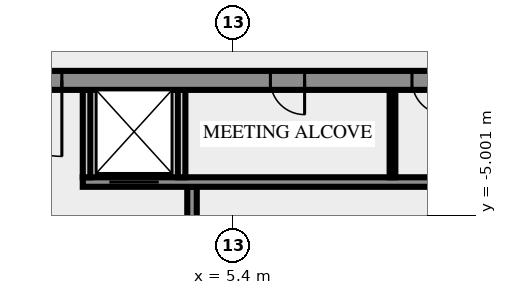
"""IFC4 building model, lengths in metres.
Left out: names, types, materials, properties, quantities, classifications, styles, units other than length and angle.
Written with IfcOpenShell. Run it as: python <this file> out.ifc"""

import sys

from ifc_helpers import new_model, si_unit, direction, frame, frame_2d, origin, place, context, subcontext, project, spatial, rectangle, extrude, element, fill, save


model = new_model("IFC4")
c1 = context("Model", 3, precision=1e-05, world=origin(), true_north=direction((0.0, 1.0)))
c2 = subcontext(c1, "Body", "Model", "MODEL_VIEW")
j1 = project(units=[si_unit("LENGTHUNIT", "METRE"), si_unit("PLANEANGLEUNIT", "RADIAN")], contexts=[c1])
p1 = place(None, origin())
s1 = spatial("IfcSite", under=j1, at=p1, CompositionType="ELEMENT")
p2 = place(p1, origin())
s2 = spatial("IfcBuilding", under=s1, at=p2, CompositionType="ELEMENT")
p3 = place(p2, frame((0.0, 0.0, 265.0)))
s3 = spatial("IfcBuildingStorey", under=s2, at=p3, CompositionType="ELEMENT", Elevation=265.0)
p4 = place(p3, frame((4.325, -7.25, 0.0), z_axis=(0.0, 0.0, 1.0), x_axis=(0.0, 1.0, 0.0)))
e1 = element("IfcWall", 1, at=p4, inside=s3, PredefinedType="SHEAR", context=c2, shape_type="SweptSolid", body=[
    extrude(rectangle(XDim=3.0, YDim=0.25, at=frame_2d((1.5, 0.0))), origin(), (0.0, 0.0, 1.0), 3.65),
])
p5 = place(p4, frame((0.8, 0.0, 0.0)))
e2 = element("IfcOpeningElement", 2, at=p5, cuts=e1, PredefinedType="OPENING", context=c2, shape_type="SweptSolid", body=[
    extrude(rectangle(XDim=1.4, YDim=2.1, at=frame_2d((0.7, 1.05))), frame((0.0, 0.135, 0.0), z_axis=(0.0, -1.0, 0.0), x_axis=(1.0, 0.0, 0.0)), (0.0, 0.0, 1.0), 0.27),
])
p6 = place(p3, frame((1.45, -4.125, 0.0), z_axis=(0.0, 0.0, 1.0), x_axis=(1.0, 0.0, 0.0)))
e3 = element("IfcWall", 3, at=p6, inside=s3, PredefinedType="SHEAR", context=c2, shape_type="SweptSolid", body=[
    extrude(rectangle(XDim=12.9, YDim=0.25, at=frame_2d((6.45, 0.0))), origin(), (0.0, 0.0, 1.0), 3.65),
])
p7 = place(p6, frame((0.7, 0.0, 0.0)))
e4 = element("IfcOpeningElement", 4, at=p7, cuts=e3, PredefinedType="OPENING", context=c2, shape_type="SweptSolid", body=[
    extrude(rectangle(XDim=1.3, YDim=2.1, at=frame_2d((0.65, 1.05))), frame((0.0, 0.135, 0.0), z_axis=(0.0, -1.0, 0.0), x_axis=(1.0, 0.0, 0.0)), (0.0, 0.0, 1.0), 0.27),
])
for number, where, z_axis, x_axis in (
    (5, (1.55, -4.0, 0.0), (0.0, 0.0, 1.0), (0.0, 1.0, 0.0)),
    (6, (4.05, -4.0, 0.0), (0.0, 0.0, 1.0), (0.0, 1.0, 0.0)),
):
    element("IfcWall", number, at=place(p3, frame(where, z_axis=z_axis, x_axis=x_axis)), inside=s3, PredefinedType="SOLIDWALL", context=c2, shape_type="SweptSolid", body=[
        extrude(rectangle(XDim=2.3, YDim=0.2, at=frame_2d((1.15, 0.0))), origin(), (0.0, 0.0, 1.0), 3.65),
    ])
p8 = place(p3, frame((9.6, -4.0, 0.0), z_axis=(0.0, 0.0, 1.0), x_axis=(0.0, 1.0, 0.0)))
e7 = element("IfcWall", 7, at=p8, inside=s3, PredefinedType="PARTITIONING", context=c2, shape_type="SweptSolid", body=[
    extrude(rectangle(XDim=2.3, YDim=0.15, at=frame_2d((1.15, 0.0))), origin(), (0.0, 0.0, 1.0), 3.65),
])
p9 = place(p3, frame((20.49, -1.45, 0.0), z_axis=(0.0, 0.0, 1.0), x_axis=(-1.0, 0.0, 0.0)))
e8 = element("IfcWall", 8, at=p9, inside=s3, PredefinedType="SHEAR", context=c2, shape_type="SweptSolid", body=[
    extrude(rectangle(XDim=40.98, YDim=0.5, at=frame_2d((20.49, 0.0))), origin(), (0.0, 0.0, 1.0), 3.65),
])
p10 = place(p9, frame((38.14, 0.0, 0.0)))
e9 = element("IfcOpeningElement", 9, at=p10, cuts=e8, PredefinedType="OPENING", context=c2, shape_type="SweptSolid", body=[
    extrude(rectangle(XDim=1.8, YDim=2.1, at=frame_2d((0.9, 1.05))), frame((0.0, 0.26, 0.0), z_axis=(0.0, -1.0, 0.0), x_axis=(1.0, 0.0, 0.0)), (0.0, 0.0, 1.0), 0.52),
])
p11 = place(p9, frame((36.728, 0.0, 0.0)))
e10 = element("IfcOpeningElement", 10, at=p11, cuts=e8, PredefinedType="OPENING", context=c2, shape_type="SweptSolid", body=[
    extrude(rectangle(XDim=0.8, YDim=2.1, at=frame_2d((0.4, 1.05))), frame((0.0, 0.26, 0.0), z_axis=(0.0, -1.0, 0.0), x_axis=(1.0, 0.0, 0.0)), (0.0, 0.0, 1.0), 0.52),
])
p12 = place(p9, frame((35.153, 0.0, 0.0)))
e11 = element("IfcOpeningElement", 11, at=p12, cuts=e8, PredefinedType="OPENING", context=c2, shape_type="SweptSolid", body=[
    extrude(rectangle(XDim=0.8, YDim=2.1, at=frame_2d((0.4, 1.05))), frame((0.0, 0.26, 0.0), z_axis=(0.0, -1.0, 0.0), x_axis=(1.0, 0.0, 0.0)), (0.0, 0.0, 1.0), 0.52),
])
p13 = place(p9, frame((32.94, 0.0, 0.0)))
e12 = element("IfcOpeningElement", 12, at=p13, cuts=e8, PredefinedType="OPENING", context=c2, shape_type="SweptSolid", body=[
    extrude(rectangle(XDim=0.9, YDim=2.1, at=frame_2d((0.45, 1.05))), frame((0.0, 0.26, 0.0), z_axis=(0.0, -1.0, 0.0), x_axis=(1.0, 0.0, 0.0)), (0.0, 0.0, 1.0), 0.52),
])
p14 = place(p9, frame((31.015, 0.0, 0.0)))
e13 = element("IfcOpeningElement", 13, at=p14, cuts=e8, PredefinedType="OPENING", context=c2, shape_type="SweptSolid", body=[
    extrude(rectangle(XDim=0.8, YDim=2.1, at=frame_2d((0.4, 1.05))), frame((0.0, 0.26, 0.0), z_axis=(0.0, -1.0, 0.0), x_axis=(1.0, 0.0, 0.0)), (0.0, 0.0, 1.0), 0.52),
])
p15 = place(p9, frame((24.765, 0.0, 0.0)))
e14 = element("IfcOpeningElement", 14, at=p15, cuts=e8, PredefinedType="OPENING", context=c2, shape_type="SweptSolid", body=[
    extrude(rectangle(XDim=0.8, YDim=2.1, at=frame_2d((0.4, 1.05))), frame((0.0, 0.26, 0.0), z_axis=(0.0, -1.0, 0.0), x_axis=(1.0, 0.0, 0.0)), (0.0, 0.0, 1.0), 0.52),
])
p16 = place(p9, frame((19.59, 0.0, 0.0)))
e15 = element("IfcOpeningElement", 15, at=p16, cuts=e8, PredefinedType="OPENING", context=c2, shape_type="SweptSolid", body=[
    extrude(rectangle(XDim=2.0, YDim=2.1, at=frame_2d((1.0, 1.05))), frame((0.0, 0.26, 0.0), z_axis=(0.0, -1.0, 0.0), x_axis=(1.0, 0.0, 0.0)), (0.0, 0.0, 1.0), 0.52),
])
p17 = place(p9, frame((13.202, 0.0, 0.0)))
e16 = element("IfcOpeningElement", 16, at=p17, cuts=e8, PredefinedType="OPENING", context=c2, shape_type="SweptSolid", body=[
    extrude(rectangle(XDim=0.9, YDim=2.1, at=frame_2d((0.45, 1.05))), frame((0.0, 0.26, 0.0), z_axis=(0.0, -1.0, 0.0), x_axis=(1.0, 0.0, 0.0)), (0.0, 0.0, 1.0), 0.52),
])
p18 = place(p9, frame((9.478, 0.0, 0.0)))
e17 = element("IfcOpeningElement", 17, at=p18, cuts=e8, PredefinedType="OPENING", context=c2, shape_type="SweptSolid", body=[
    extrude(rectangle(XDim=0.9, YDim=2.1, at=frame_2d((0.45, 1.05))), frame((0.0, 0.26, 0.0), z_axis=(0.0, -1.0, 0.0), x_axis=(1.0, 0.0, 0.0)), (0.0, 0.0, 1.0), 0.52),
])
p19 = place(p9, frame((7.14, 0.0, 0.0)))
e18 = element("IfcOpeningElement", 18, at=p19, cuts=e8, PredefinedType="OPENING", context=c2, shape_type="SweptSolid", body=[
    extrude(rectangle(XDim=0.9, YDim=2.1, at=frame_2d((0.45, 1.05))), frame((0.0, 0.26, 0.0), z_axis=(0.0, -1.0, 0.0), x_axis=(1.0, 0.0, 0.0)), (0.0, 0.0, 1.0), 0.52),
])
p20 = place(p9, frame((4.19, 0.0, 0.0)))
e19 = element("IfcOpeningElement", 19, at=p20, cuts=e8, PredefinedType="OPENING", context=c2, shape_type="SweptSolid", body=[
    extrude(rectangle(XDim=0.9, YDim=2.1, at=frame_2d((0.45, 1.05))), frame((0.0, 0.26, 0.0), z_axis=(0.0, -1.0, 0.0), x_axis=(1.0, 0.0, 0.0)), (0.0, 0.0, 1.0), 0.52),
])
p21 = place(p9, frame((1.04, 0.0, 0.0)))
e20 = element("IfcOpeningElement", 20, at=p21, cuts=e8, PredefinedType="OPENING", context=c2, shape_type="SweptSolid", body=[
    extrude(rectangle(XDim=1.8, YDim=2.1, at=frame_2d((0.9, 1.05))), frame((0.0, 0.26, 0.0), z_axis=(0.0, -1.0, 0.0), x_axis=(1.0, 0.0, 0.0)), (0.0, 0.0, 1.0), 0.52),
])
p22 = place(p7, origin())
e21 = element("IfcDoor", 21, at=p22, inside=s3, OperationType="DOUBLE_DOOR_SLIDING", PredefinedType="DOOR", context=c2, shape_type="SweptSolid", body=[
    extrude(rectangle(XDim=1.3, YDim=2.1, at=frame_2d((0.65, 1.05))), frame((0.0, 0.025, 0.0), z_axis=(0.0, -1.0, 0.0), x_axis=(1.0, 0.0, 0.0)), (0.0, 0.0, 1.0), 0.05),
])
fill(e4, e21)
p23 = place(p16, origin())
e22 = element("IfcDoor", 22, at=p23, inside=s3, OperationType="DOUBLE_DOOR_SINGLE_SWING", PredefinedType="DOOR", context=c2, shape_type="SweptSolid", body=[
    extrude(rectangle(XDim=2.0, YDim=2.1, at=frame_2d((1.0, 1.05))), frame((0.0, 0.025, 0.0), z_axis=(0.0, -1.0, 0.0), x_axis=(1.0, 0.0, 0.0)), (0.0, 0.0, 1.0), 0.05),
])
fill(e15, e22)
p24 = place(p17, origin())
e23 = element("IfcDoor", 23, at=p24, inside=s3, OperationType="SINGLE_SWING_LEFT", PredefinedType="DOOR", context=c2, shape_type="SweptSolid", body=[
    extrude(rectangle(XDim=0.9, YDim=2.1, at=frame_2d((0.45, 1.05))), frame((0.0, 0.025, 0.0), z_axis=(0.0, -1.0, 0.0), x_axis=(1.0, 0.0, 0.0)), (0.0, 0.0, 1.0), 0.05),
])
fill(e16, e23)
p25 = place(p18, origin())
e24 = element("IfcDoor", 24, at=p25, inside=s3, OperationType="SINGLE_SWING_LEFT", PredefinedType="DOOR", context=c2, shape_type="SweptSolid", body=[
    extrude(rectangle(XDim=0.9, YDim=2.1, at=frame_2d((0.45, 1.05))), frame((0.0, 0.025, 0.0), z_axis=(0.0, -1.0, 0.0), x_axis=(1.0, 0.0, 0.0)), (0.0, 0.0, 1.0), 0.05),
])
fill(e17, e24)
save(model, sys.argv[1])
